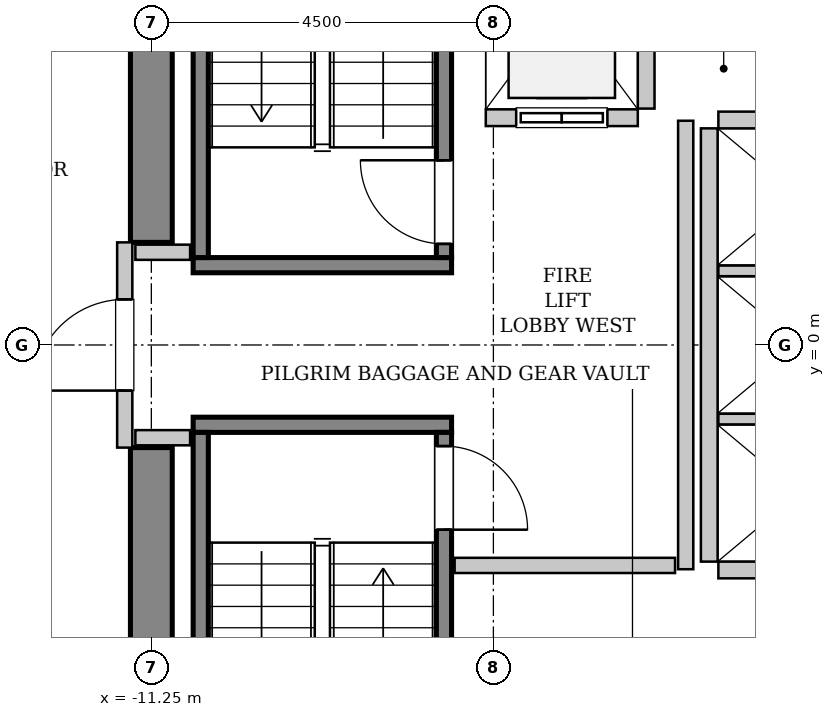
"""IFC4 building model, lengths in metres.
Left out: names, types, materials, properties, quantities, classifications, styles, units other than length and angle.
Written with IfcOpenShell. Run it as: python <this file> out.ifc"""

import sys

from ifc_helpers import new_model, si_unit, direction, frame, frame_2d, origin, place, context, subcontext, project, spatial, rectangle, extrude, source, transform, mapped, element, fill, save


model = new_model("IFC4")
c1 = context("Model", 3, precision=1e-05, world=origin(), true_north=direction((0.0, 1.0)))
c2 = subcontext(c1, "Body", "Model", "MODEL_VIEW")
j1 = project(units=[si_unit("LENGTHUNIT", "METRE"), si_unit("PLANEANGLEUNIT", "RADIAN")], contexts=[c1])
p1 = place(None, origin())
s1 = spatial("IfcSite", under=j1, at=p1, CompositionType="ELEMENT")
p2 = place(p1, origin())
s2 = spatial("IfcBuilding", under=s1, at=p2, CompositionType="ELEMENT")
p3 = place(p2, frame((0.0, 0.0, 102.2)))
s3 = spatial("IfcBuildingStorey", under=s2, at=p3, CompositionType="ELEMENT", Elevation=102.2)
m1 = source(origin(), c2, "Body", "SweptSolid", [
    extrude(rectangle(XDim=7.375, YDim=0.55, at=frame_2d((3.688, 0.0))), origin(), (0.0, 0.0, 1.0), 3.8),
])
for number, where, z_axis, x_axis in (
    (1, (-11.25, -8.725, 0.0), (0.0, 0.0, 1.0), (0.0, 1.0, 0.0)),
    (2, (-11.25, 1.35, 0.0), (0.0, 0.0, 1.0), (0.0, 1.0, 0.0)),
):
    element("IfcWall", number, at=place(p3, frame(where, z_axis=z_axis, x_axis=x_axis)), inside=s3, PredefinedType="SHEAR", context=c2, shape_type="MappedRepresentation", body=[
        mapped(m1, transform((0.0, 0.0, 0.0), x_axis=(1.0, 0.0, 0.0), y_axis=(0.0, 1.0, 0.0), z_axis=(0.0, 0.0, 1.0), scale=1.0)),
    ])
m2 = source(origin(), c2, "Body", "SweptSolid", [
    extrude(rectangle(XDim=3.4, YDim=0.2, at=frame_2d((1.7, 0.0))), origin(), (0.0, 0.0, 1.0), 3.8),
])
p4 = place(p3, frame((-7.3, 1.05, 0.0), z_axis=(0.0, 0.0, 1.0), x_axis=(-1.0, 0.0, 0.0)))
e3 = element("IfcWall", 3, at=p4, inside=s3, PredefinedType="SOLIDWALL", context=c2, shape_type="MappedRepresentation", body=[
    mapped(m2, transform((0.0, 0.0, 0.0), x_axis=(1.0, 0.0, 0.0), y_axis=(0.0, 1.0, 0.0), z_axis=(0.0, 0.0, 1.0), scale=1.0)),
])
m3 = source(origin(), c2, "Body", "SweptSolid", [
    extrude(rectangle(XDim=7.1, YDim=0.2, at=frame_2d((3.55, 0.0))), origin(), (0.0, 0.0, 1.0), 3.8),
])
p5 = place(p3, frame((-7.4, 1.15, 0.0), z_axis=(0.0, 0.0, 1.0), x_axis=(0.0, 1.0, 0.0)))
e4 = element("IfcWall", 4, at=p5, inside=s3, PredefinedType="SOLIDWALL", context=c2, shape_type="MappedRepresentation", body=[
    mapped(m3, transform((0.0, 0.0, 0.0), x_axis=(1.0, 0.0, 0.0), y_axis=(0.0, 1.0, 0.0), z_axis=(0.0, 0.0, 1.0), scale=1.0)),
])
p6 = place(p5, frame((0.18, 0.0, 0.0)))
e5 = element("IfcOpeningElement", 5, at=p6, cuts=e4, PredefinedType="OPENING", context=c2, shape_type="SweptSolid", body=[
    extrude(rectangle(XDim=1.1, YDim=2.15, at=frame_2d((0.55, 1.075))), frame((0.0, 0.11, 0.0), z_axis=(0.0, -1.0, 0.0), x_axis=(1.0, 0.0, 0.0)), (0.0, 0.0, 1.0), 0.22),
])
p7 = place(p3, frame((-10.6, 1.15, 0.0), z_axis=(0.0, 0.0, 1.0), x_axis=(0.0, 1.0, 0.0)))
e6 = element("IfcWall", 6, at=p7, inside=s3, PredefinedType="SOLIDWALL", context=c2, shape_type="MappedRepresentation", body=[
    mapped(m3, transform((0.0, 0.0, 0.0), x_axis=(1.0, 0.0, 0.0), y_axis=(0.0, 1.0, 0.0), z_axis=(0.0, 0.0, 1.0), scale=1.0)),
])
p8 = place(p3, frame((-10.7, -1.05, 0.0), z_axis=(0.0, 0.0, 1.0), x_axis=(1.0, 0.0, 0.0)))
e7 = element("IfcWall", 7, at=p8, inside=s3, PredefinedType="SOLIDWALL", context=c2, shape_type="MappedRepresentation", body=[
    mapped(m2, transform((0.0, 0.0, 0.0), x_axis=(1.0, 0.0, 0.0), y_axis=(0.0, 1.0, 0.0), z_axis=(0.0, 0.0, 1.0), scale=1.0)),
])
p9 = place(p3, frame((-10.6, -1.15, 0.0), z_axis=(0.0, 0.0, 1.0), x_axis=(0.0, -1.0, 0.0)))
e8 = element("IfcWall", 8, at=p9, inside=s3, PredefinedType="SOLIDWALL", context=c2, shape_type="MappedRepresentation", body=[
    mapped(m3, transform((0.0, 0.0, 0.0), x_axis=(1.0, 0.0, 0.0), y_axis=(0.0, 1.0, 0.0), z_axis=(0.0, 0.0, 1.0), scale=1.0)),
])
p10 = place(p3, frame((-7.4, -1.15, 0.0), z_axis=(0.0, 0.0, 1.0), x_axis=(0.0, -1.0, 0.0)))
e9 = element("IfcWall", 9, at=p10, inside=s3, PredefinedType="SOLIDWALL", context=c2, shape_type="MappedRepresentation", body=[
    mapped(m3, transform((0.0, 0.0, 0.0), x_axis=(1.0, 0.0, 0.0), y_axis=(0.0, 1.0, 0.0), z_axis=(0.0, 0.0, 1.0), scale=1.0)),
])
p11 = place(p10, frame((0.18, 0.0, 0.0)))
e10 = element("IfcOpeningElement", 10, at=p11, cuts=e9, PredefinedType="OPENING", context=c2, shape_type="SweptSolid", body=[
    extrude(rectangle(XDim=1.1, YDim=2.15, at=frame_2d((0.55, 1.075))), frame((0.0, 0.11, 0.0), z_axis=(0.0, -1.0, 0.0), x_axis=(1.0, 0.0, 0.0)), (0.0, 0.0, 1.0), 0.22),
])
m4 = source(origin(), c2, "Body", "SweptSolid", [
    extrude(rectangle(XDim=2.0, YDim=0.22, at=frame_2d((1.0, 0.0))), origin(), (0.0, 0.0, 1.0), 3.535),
])
p12 = place(p3, frame((-6.85, 2.99, 0.0), z_axis=(0.0, 0.0, 1.0), x_axis=(1.0, 0.0, 0.0)))
e11 = element("IfcWall", 11, at=p12, inside=s3, PredefinedType="SOLIDWALL", context=c2, shape_type="MappedRepresentation", body=[
    mapped(m4, transform((0.0, 0.0, 0.0), x_axis=(1.0, 0.0, 0.0), y_axis=(0.0, 1.0, 0.0), z_axis=(0.0, 0.0, 1.0), scale=1.0)),
])
p13 = place(p12, frame((0.4, 0.0, 0.0)))
e12 = element("IfcOpeningElement", 12, at=p13, cuts=e11, PredefinedType="OPENING", context=c2, shape_type="SweptSolid", body=[
    extrude(rectangle(XDim=1.2, YDim=2.2, at=frame_2d((0.6, 1.1))), frame((0.0, 0.12, 0.0), z_axis=(0.0, -1.0, 0.0), x_axis=(1.0, 0.0, 0.0)), (0.0, 0.0, 1.0), 0.24),
])
m5 = source(origin(), c2, "Body", "SweptSolid", [
    extrude(rectangle(XDim=2.68, YDim=0.22, at=frame_2d((1.34, 0.0))), origin(), (0.0, 0.0, 1.0), 3.535),
])
p14 = place(p3, frame((-4.74, 3.11, 0.0), z_axis=(0.0, 0.0, 1.0), x_axis=(0.0, 1.0, 0.0)))
e13 = element("IfcWall", 13, at=p14, inside=s3, PredefinedType="SOLIDWALL", context=c2, shape_type="MappedRepresentation", body=[
    mapped(m5, transform((0.0, 0.0, 0.0), x_axis=(1.0, 0.0, 0.0), y_axis=(0.0, 1.0, 0.0), z_axis=(0.0, 0.0, 1.0), scale=1.0)),
])
m6 = source(origin(), c2, "Body", "SweptSolid", [
    extrude(rectangle(XDim=5.7, YDim=0.22, at=frame_2d((2.85, 0.0))), origin(), (0.0, 0.0, 1.0), 3.535),
])
p15 = place(p3, frame((-3.91, 2.85, 0.0), z_axis=(0.0, 0.0, 1.0), x_axis=(0.0, -1.0, 0.0)))
e14 = element("IfcWall", 14, at=p15, inside=s3, PredefinedType="SOLIDWALL", context=c2, shape_type="MappedRepresentation", body=[
    mapped(m6, transform((0.0, 0.0, 0.0), x_axis=(1.0, 0.0, 0.0), y_axis=(0.0, 1.0, 0.0), z_axis=(0.0, 0.0, 1.0), scale=1.0)),
])
m7 = source(origin(), c2, "Body", "SweptSolid", [
    extrude(rectangle(XDim=2.13, YDim=0.22, at=frame_2d((1.065, 0.0))), origin(), (0.0, 0.0, 1.0), 3.535),
])
p16 = place(p3, frame((-3.79, -2.96, 0.0), z_axis=(0.0, 0.0, 1.0), x_axis=(1.0, 0.0, 0.0)))
e15 = element("IfcWall", 15, at=p16, inside=s3, PredefinedType="SOLIDWALL", context=c2, shape_type="MappedRepresentation", body=[
    mapped(m7, transform((0.0, 0.0, 0.0), x_axis=(1.0, 0.0, 0.0), y_axis=(0.0, 1.0, 0.0), z_axis=(0.0, 0.0, 1.0), scale=1.0)),
])
m8 = source(origin(), c2, "Body", "SweptSolid", [
    extrude(rectangle(XDim=2.13, YDim=0.14, at=frame_2d((1.065, 0.0))), origin(), (0.0, 0.0, 1.0), 3.535),
])
for number, where, z_axis, x_axis in (
    (16, (-3.79, -0.975, 0.0), (0.0, 0.0, 1.0), (1.0, 0.0, 0.0)),
    (17, (-3.79, 0.975, 0.0), (0.0, 0.0, 1.0), (1.0, 0.0, 0.0)),
):
    element("IfcWall", number, at=place(p3, frame(where, z_axis=z_axis, x_axis=x_axis)), inside=s3, PredefinedType="PARTITIONING", context=c2, shape_type="MappedRepresentation", body=[
        mapped(m8, transform((0.0, 0.0, 0.0), x_axis=(1.0, 0.0, 0.0), y_axis=(0.0, 1.0, 0.0), z_axis=(0.0, 0.0, 1.0), scale=1.0)),
    ])
p17 = place(p3, frame((-1.66, 2.96, 0.0), z_axis=(0.0, 0.0, 1.0), x_axis=(-1.0, 0.0, 0.0)))
e18 = element("IfcWall", 18, at=p17, inside=s3, PredefinedType="SOLIDWALL", context=c2, shape_type="MappedRepresentation", body=[
    mapped(m7, transform((0.0, 0.0, 0.0), x_axis=(1.0, 0.0, 0.0), y_axis=(0.0, 1.0, 0.0), z_axis=(0.0, 0.0, 1.0), scale=1.0)),
])
m9 = source(origin(), c2, "Body", "SweptSolid", [
    extrude(rectangle(XDim=2.7, YDim=0.2, at=frame_2d((1.35, 0.0))), origin(), (0.0, 0.0, 1.0), 2.425),
])
p18 = place(p3, frame((-11.6, -1.35, 0.0), z_axis=(0.0, 0.0, 1.0), x_axis=(0.0, 1.0, 0.0)))
e19 = element("IfcWall", 19, at=p18, inside=s3, PredefinedType="PARTITIONING", context=c2, shape_type="MappedRepresentation", body=[
    mapped(m9, transform((0.0, 0.0, 0.0), x_axis=(1.0, 0.0, 0.0), y_axis=(0.0, 1.0, 0.0), z_axis=(0.0, 0.0, 1.0), scale=1.0)),
])
p19 = place(p18, frame((0.75, 0.0, 0.0)))
e20 = element("IfcOpeningElement", 20, at=p19, cuts=e19, PredefinedType="OPENING", context=c2, shape_type="SweptSolid", body=[
    extrude(rectangle(XDim=1.2, YDim=2.15, at=frame_2d((0.6, 1.075))), frame((0.0, 0.11, 0.0), z_axis=(0.0, -1.0, 0.0), x_axis=(1.0, 0.0, 0.0)), (0.0, 0.0, 1.0), 0.22),
])
m10 = source(origin(), c2, "Body", "SweptSolid", [
    extrude(rectangle(XDim=5.9, YDim=0.2, at=frame_2d((2.95, 0.0))), origin(), (0.0, 0.0, 1.0), 3.535),
])
p20 = place(p3, frame((-4.22, -2.95, 0.0), z_axis=(0.0, 0.0, 1.0), x_axis=(0.0, 1.0, 0.0)))
e21 = element("IfcWall", 21, at=p20, inside=s3, PredefinedType="PARTITIONING", context=c2, shape_type="MappedRepresentation", body=[
    mapped(m10, transform((0.0, 0.0, 0.0), x_axis=(1.0, 0.0, 0.0), y_axis=(0.0, 1.0, 0.0), z_axis=(0.0, 0.0, 1.0), scale=1.0)),
])
m11 = source(origin(), c2, "Body", "SweptSolid", [
    extrude(rectangle(XDim=2.9, YDim=0.2, at=frame_2d((1.45, 0.0))), origin(), (0.0, 0.0, 1.0), 3.535),
])
p21 = place(p3, frame((-7.26, -2.9, 0.0), z_axis=(0.0, 0.0, 1.0), x_axis=(1.0, 0.0, 0.0)))
e22 = element("IfcWall", 22, at=p21, inside=s3, PredefinedType="PARTITIONING", context=c2, shape_type="MappedRepresentation", body=[
    mapped(m11, transform((0.0, 0.0, 0.0), x_axis=(1.0, 0.0, 0.0), y_axis=(0.0, 1.0, 0.0), z_axis=(0.0, 0.0, 1.0), scale=1.0)),
])
m12 = source(origin(), c2, "Body", "SweptSolid", [
    extrude(rectangle(XDim=0.72, YDim=0.2, at=frame_2d((0.36, 0.0))), origin(), (0.0, 0.0, 1.0), 3.535),
])
for number, where, z_axis, x_axis in (
    (23, (-11.46, 1.22, 0.0), (0.0, 0.0, 1.0), (1.0, 0.0, 0.0)),
    (24, (-11.46, -1.22, 0.0), (0.0, 0.0, 1.0), (1.0, 0.0, 0.0)),
):
    element("IfcWall", number, at=place(p3, frame(where, z_axis=z_axis, x_axis=x_axis)), inside=s3, PredefinedType="PARTITIONING", context=c2, shape_type="MappedRepresentation", body=[
        mapped(m12, transform((0.0, 0.0, 0.0), x_axis=(1.0, 0.0, 0.0), y_axis=(0.0, 1.0, 0.0), z_axis=(0.0, 0.0, 1.0), scale=1.0)),
    ])
m13 = source(origin(), c2, "Body", "SweptSolid", [
    extrude(rectangle(XDim=1.1, YDim=2.15, at=frame_2d((0.55, 1.075))), frame((0.0, 0.025, 0.0), z_axis=(0.0, -1.0, 0.0), x_axis=(1.0, 0.0, 0.0)), (0.0, 0.0, 1.0), 0.05),
])
p22 = place(p6, origin())
e25 = element("IfcDoor", 25, at=p22, inside=s3, OperationType="SINGLE_SWING_RIGHT", PredefinedType="DOOR", context=c2, shape_type="MappedRepresentation", body=[
    mapped(m13, transform((0.0, 0.0, 0.0), x_axis=(1.0, 0.0, 0.0), y_axis=(0.0, 1.0, 0.0), z_axis=(0.0, 0.0, 1.0), scale=1.0)),
])
fill(e5, e25)
p23 = place(p11, origin())
e26 = element("IfcDoor", 26, at=p23, inside=s3, OperationType="SINGLE_SWING_RIGHT", PredefinedType="DOOR", context=c2, shape_type="MappedRepresentation", body=[
    mapped(m13, transform((0.0, 0.0, 0.0), x_axis=(1.0, 0.0, 0.0), y_axis=(0.0, 1.0, 0.0), z_axis=(0.0, 0.0, 1.0), scale=1.0)),
])
fill(e10, e26)
m14 = source(origin(), c2, "Body", "SweptSolid", [
    extrude(rectangle(XDim=1.2, YDim=2.2, at=frame_2d((0.6, 1.1))), frame((0.0, 0.025, 0.0), z_axis=(0.0, -1.0, 0.0), x_axis=(1.0, 0.0, 0.0)), (0.0, 0.0, 1.0), 0.05),
])
p24 = place(p13, origin())
e27 = element("IfcDoor", 27, at=p24, inside=s3, OperationType="SLIDING_TO_LEFT", PredefinedType="DOOR", context=c2, shape_type="MappedRepresentation", body=[
    mapped(m14, transform((0.0, 0.0, 0.0), x_axis=(1.0, 0.0, 0.0), y_axis=(0.0, 1.0, 0.0), z_axis=(0.0, 0.0, 1.0), scale=1.0)),
])
fill(e12, e27)
m15 = source(origin(), c2, "Body", "SweptSolid", [
    extrude(rectangle(XDim=1.2, YDim=2.15, at=frame_2d((0.6, 1.075))), frame((0.0, 0.025, 0.0), z_axis=(0.0, -1.0, 0.0), x_axis=(1.0, 0.0, 0.0)), (0.0, 0.0, 1.0), 0.05),
])
p25 = place(p19, origin())
e28 = element("IfcDoor", 28, at=p25, inside=s3, OperationType="SINGLE_SWING_LEFT", PredefinedType="DOOR", context=c2, shape_type="MappedRepresentation", body=[
    mapped(m15, transform((0.0, 0.0, 0.0), x_axis=(1.0, 0.0, 0.0), y_axis=(0.0, 1.0, 0.0), z_axis=(0.0, 0.0, 1.0), scale=1.0)),
])
fill(e20, e28)
save(model, sys.argv[1])
